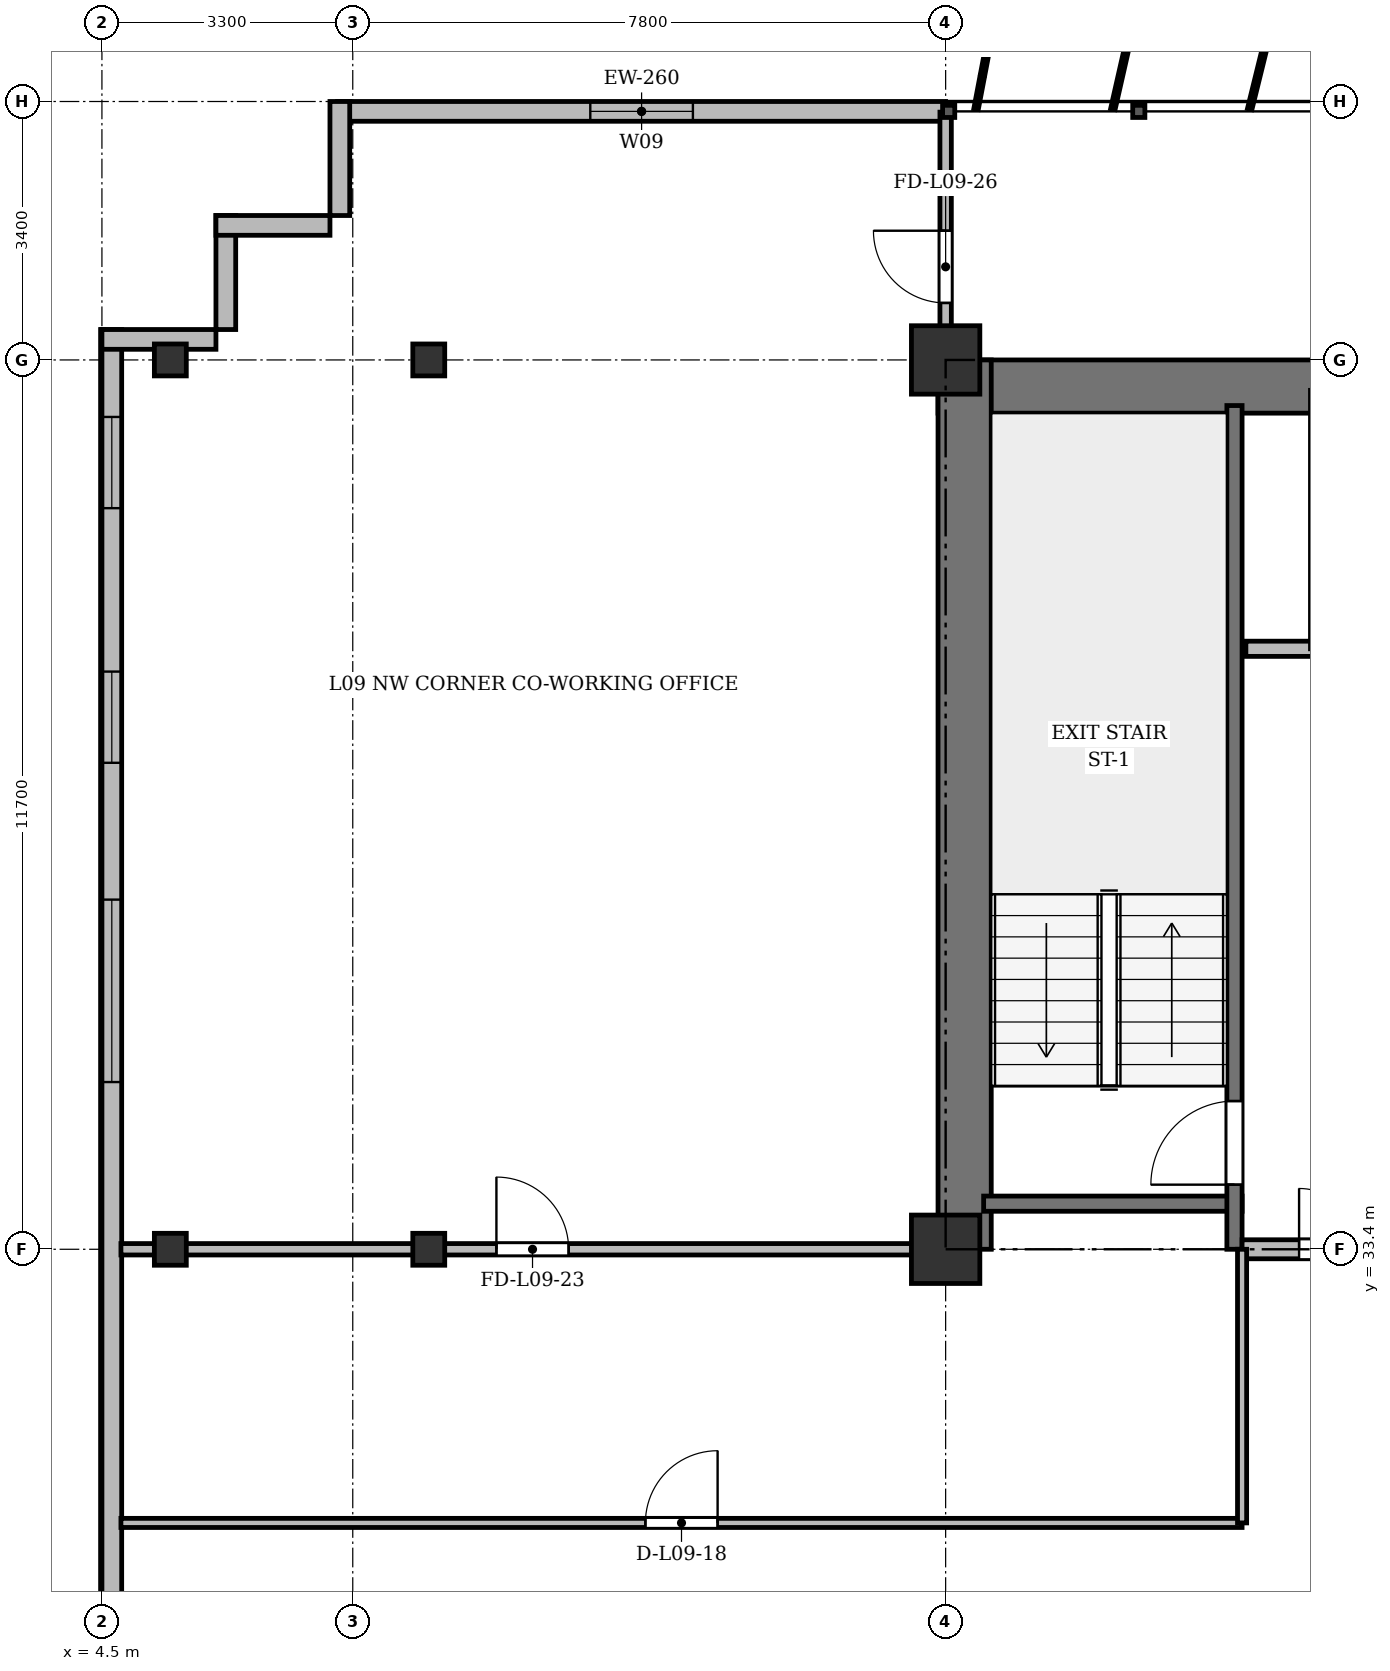
"""IFC4 building model, lengths in metres.
Left out: names, types, materials, properties, quantities, classifications, styles, units other than length and angle.
Written with IfcOpenShell. Run it as: python <this file> out.ifc"""

import sys

from ifc_helpers import new_model, si_unit, direction, frame, frame_2d, origin, origin_2d, place, context, subcontext, project, spatial, rectangle, i_section, extrude, source, transform, mapped, element, fill, save


model = new_model("IFC4")
c1 = context("Model", 3, precision=1e-05, world=origin(), true_north=direction((0.0, 1.0)))
c2 = subcontext(c1, "Body", "Model", "MODEL_VIEW")
j1 = project(units=[si_unit("LENGTHUNIT", "METRE"), si_unit("PLANEANGLEUNIT", "RADIAN")], contexts=[c1])
p1 = place(None, origin())
s1 = spatial("IfcSite", under=j1, at=p1, CompositionType="ELEMENT")
p2 = place(p1, origin())
s2 = spatial("IfcBuilding", under=s1, at=p2, CompositionType="ELEMENT")
p3 = place(p2, frame((0.0, 0.0, 37.9)))
s3 = spatial("IfcBuildingStorey", under=s2, at=p3, CompositionType="ELEMENT", Elevation=37.9)
m1 = source(origin(), c2, "Body", "SweptSolid", [
    extrude(i_section(OverallWidth=0.42, OverallDepth=0.42, WebThickness=0.026, FlangeThickness=0.04, at=origin_2d()), origin(), (0.0, 0.0, 1.0), 3.6),
])
for number, where, z_axis, x_axis in (
    (1, (5.4, 33.4, 0.0), (0.0, 0.0, 1.0), (1.0, 0.0, 0.0)),
    (2, (5.4, 45.1, 0.0), (0.0, 0.0, 1.0), (1.0, 0.0, 0.0)),
    (3, (8.8, 33.4, 0.0), (0.0, 0.0, 1.0), (1.0, 0.0, 0.0)),
    (4, (8.8, 45.1, 0.0), (0.0, 0.0, 1.0), (1.0, 0.0, 0.0)),
):
    element("IfcColumn", number, at=place(p3, frame(where, z_axis=z_axis, x_axis=x_axis)), inside=s3, PredefinedType="COLUMN", context=c2, shape_type="MappedRepresentation", body=[
        mapped(m1, transform((0.0, 0.0, 0.0), x_axis=(1.0, 0.0, 0.0), y_axis=(0.0, 1.0, 0.0), z_axis=(0.0, 0.0, 1.0), scale=1.0)),
    ])
m2 = source(origin(), c2, "Body", "SweptSolid", [
    extrude(rectangle(XDim=0.9, YDim=0.9, at=origin_2d()), origin(), (0.0, 0.0, 1.0), 3.6),
])
for number, where, z_axis, x_axis in (
    (5, (15.6, 33.4, 0.0), (0.0, 0.0, 1.0), (1.0, 0.0, 0.0)),
    (6, (15.6, 45.1, 0.0), (0.0, 0.0, 1.0), (1.0, 0.0, 0.0)),
):
    element("IfcColumn", number, at=place(p3, frame(where, z_axis=z_axis, x_axis=x_axis)), inside=s3, PredefinedType="COLUMN", context=c2, shape_type="MappedRepresentation", body=[
        mapped(m2, transform((0.0, 0.0, 0.0), x_axis=(1.0, 0.0, 0.0), y_axis=(0.0, 1.0, 0.0), z_axis=(0.0, 0.0, 1.0), scale=1.0)),
    ])
p4 = place(p3, frame((7.6, 48.37, 0.0), z_axis=(0.0, 0.0, 1.0), x_axis=(1.0, 0.0, 0.0)))
e7 = element("IfcWall", 7, at=p4, inside=s3, PredefinedType="SOLIDWALL", context=c2, shape_type="SweptSolid", body=[
    extrude(rectangle(XDim=8.0, YDim=0.26, at=frame_2d((4.0, 0.0))), origin(), (0.0, 0.0, 1.0), 3.34),
])
p5 = place(p4, frame((3.325, 0.0, 0.9)))
e8 = element("IfcOpeningElement", 8, at=p5, cuts=e7, PredefinedType="OPENING", context=c2, shape_type="SweptSolid", body=[
    extrude(rectangle(XDim=1.35, YDim=1.5, at=frame_2d((0.675, 0.75))), frame((0.0, 0.14, 0.0), z_axis=(0.0, -1.0, 0.0), x_axis=(1.0, 0.0, 0.0)), (0.0, 0.0, 1.0), 0.28),
])
p6 = place(p3, frame((4.63, 5.9, 0.0), z_axis=(0.0, 0.0, 1.0), x_axis=(0.0, 1.0, 0.0)))
e9 = element("IfcWall", 9, at=p6, inside=s3, PredefinedType="SOLIDWALL", context=c2, shape_type="SweptSolid", body=[
    extrude(rectangle(XDim=39.6, YDim=0.26, at=frame_2d((19.8, 0.0))), origin(), (0.0, 0.0, 1.0), 3.34),
])
p7 = place(p6, frame((1.45, 0.0, 0.92)))
e10 = element("IfcOpeningElement", 10, at=p7, cuts=e9, PredefinedType="OPENING", context=c2, shape_type="SweptSolid", body=[
    extrude(rectangle(XDim=1.2, YDim=1.65, at=frame_2d((0.6, 0.825))), frame((0.0, 0.14, 0.0), z_axis=(0.0, -1.0, 0.0), x_axis=(1.0, 0.0, 0.0)), (0.0, 0.0, 1.0), 0.28),
])
p8 = place(p6, frame((4.3, 0.0, 0.92)))
e11 = element("IfcOpeningElement", 11, at=p8, cuts=e9, PredefinedType="OPENING", context=c2, shape_type="SweptSolid", body=[
    extrude(rectangle(XDim=2.4, YDim=2.1, at=frame_2d((1.2, 1.05))), frame((0.0, 0.14, 0.0), z_axis=(0.0, -1.0, 0.0), x_axis=(1.0, 0.0, 0.0)), (0.0, 0.0, 1.0), 0.28),
])
p9 = place(p6, frame((15.7, 0.0, 0.92)))
e12 = element("IfcOpeningElement", 12, at=p9, cuts=e9, PredefinedType="OPENING", context=c2, shape_type="SweptSolid", body=[
    extrude(rectangle(XDim=2.4, YDim=2.1, at=frame_2d((1.2, 1.05))), frame((0.0, 0.14, 0.0), z_axis=(0.0, -1.0, 0.0), x_axis=(1.0, 0.0, 0.0)), (0.0, 0.0, 1.0), 0.28),
])
p10 = place(p6, frame((29.7, 0.0, 0.92)))
e13 = element("IfcOpeningElement", 13, at=p10, cuts=e9, PredefinedType="OPENING", context=c2, shape_type="SweptSolid", body=[
    extrude(rectangle(XDim=2.4, YDim=2.1, at=frame_2d((1.2, 1.05))), frame((0.0, 0.14, 0.0), z_axis=(0.0, -1.0, 0.0), x_axis=(1.0, 0.0, 0.0)), (0.0, 0.0, 1.0), 0.28),
])
p11 = place(p6, frame((33.9, 0.0, 0.92)))
e14 = element("IfcOpeningElement", 14, at=p11, cuts=e9, PredefinedType="OPENING", context=c2, shape_type="SweptSolid", body=[
    extrude(rectangle(XDim=1.2, YDim=1.65, at=frame_2d((0.6, 0.825))), frame((0.0, 0.14, 0.0), z_axis=(0.0, -1.0, 0.0), x_axis=(1.0, 0.0, 0.0)), (0.0, 0.0, 1.0), 0.28),
])
p12 = place(p6, frame((37.25, 0.0, 0.92)))
e15 = element("IfcOpeningElement", 15, at=p12, cuts=e9, PredefinedType="OPENING", context=c2, shape_type="SweptSolid", body=[
    extrude(rectangle(XDim=1.2, YDim=1.65, at=frame_2d((0.6, 0.825))), frame((0.0, 0.14, 0.0), z_axis=(0.0, -1.0, 0.0), x_axis=(1.0, 0.0, 0.0)), (0.0, 0.0, 1.0), 0.28),
])
p13 = place(p3, frame((4.5, 45.37, 0.0), z_axis=(0.0, 0.0, 1.0), x_axis=(1.0, 0.0, 0.0)))
e16 = element("IfcWall", 16, at=p13, inside=s3, PredefinedType="SOLIDWALL", context=c2, shape_type="SweptSolid", body=[
    extrude(rectangle(XDim=1.5, YDim=0.26, at=frame_2d((0.75, 0.0))), origin(), (0.0, 0.0, 1.0), 2.69),
])
for number, where, z_axis, x_axis in (
    (17, (6.13, 45.5, 0.0), (0.0, 0.0, 1.0), (0.0, 1.0, 0.0)),
    (18, (6.0, 46.87, 0.0), (0.0, 0.0, 1.0), (1.0, 0.0, 0.0)),
    (19, (7.63, 47.0, 0.0), (0.0, 0.0, 1.0), (0.0, 1.0, 0.0)),
):
    element("IfcWall", number, at=place(p3, frame(where, z_axis=z_axis, x_axis=x_axis)), inside=s3, PredefinedType="SOLIDWALL", context=c2, shape_type="SweptSolid", body=[
        extrude(rectangle(XDim=1.5, YDim=0.26, at=frame_2d((0.75, 0.0))), origin(), (0.0, 0.0, 1.0), 3.34),
    ])
p14 = place(p3, frame((15.5, 44.75, 0.0), z_axis=(0.0, 0.0, 1.0), x_axis=(1.0, 0.0, 0.0)))
e20 = element("IfcWall", 20, at=p14, inside=s3, PredefinedType="SHEAR", context=c2, shape_type="SweptSolid", body=[
    extrude(rectangle(XDim=43.4, YDim=0.7, at=frame_2d((21.7, 0.0))), origin(), (0.0, 0.0, 1.0), 3.34),
])
p15 = place(p3, frame((15.85, 33.4, 0.0), z_axis=(0.0, 0.0, 1.0), x_axis=(0.0, 1.0, 0.0)))
e21 = element("IfcWall", 21, at=p15, inside=s3, PredefinedType="SHEAR", context=c2, shape_type="SweptSolid", body=[
    extrude(rectangle(XDim=11.7, YDim=0.7, at=frame_2d((5.85, 0.0))), origin(), (0.0, 0.0, 1.0), 3.34),
])
p16 = place(p3, frame((16.1, 34.0, 0.0), z_axis=(0.0, 0.0, 1.0), x_axis=(1.0, 0.0, 0.0)))
e22 = element("IfcWall", 22, at=p16, inside=s3, PredefinedType="SHEAR", context=c2, shape_type="SweptSolid", body=[
    extrude(rectangle(XDim=3.4, YDim=0.2, at=frame_2d((1.7, 0.0))), origin(), (0.0, 0.0, 1.0), 3.34),
])
p17 = place(p3, frame((19.4, 33.4, 0.0), z_axis=(0.0, 0.0, 1.0), x_axis=(0.0, 1.0, 0.0)))
e23 = element("IfcWall", 23, at=p17, inside=s3, PredefinedType="SHEAR", context=c2, shape_type="SweptSolid", body=[
    extrude(rectangle(XDim=11.1, YDim=0.2, at=frame_2d((5.55, 0.0))), origin(), (0.0, 0.0, 1.0), 3.34),
])
p18 = place(p17, frame((0.85, 0.0, 0.0)))
e24 = element("IfcOpeningElement", 24, at=p18, cuts=e23, PredefinedType="OPENING", context=c2, shape_type="SweptSolid", body=[
    extrude(rectangle(XDim=1.1, YDim=2.15, at=frame_2d((0.55, 1.075))), frame((0.0, 0.11, 0.0), z_axis=(0.0, -1.0, 0.0), x_axis=(1.0, 0.0, 0.0)), (0.0, 0.0, 1.0), 0.22),
])
p19 = place(p3, frame((19.55, 41.3, 0.0), z_axis=(0.0, 0.0, 1.0), x_axis=(1.0, 0.0, 0.0)))
e25 = element("IfcWall", 25, at=p19, inside=s3, PredefinedType="SOLIDWALL", context=c2, shape_type="SweptSolid", body=[
    extrude(rectangle(XDim=6.75, YDim=0.2, at=frame_2d((3.375, 0.0))), origin(), (0.0, 0.0, 1.0), 3.34),
])
p20 = place(p19, frame((1.7, 0.0, 0.0)))
e26 = element("IfcOpeningElement", 26, at=p20, cuts=e25, PredefinedType="OPENING", context=c2, shape_type="SweptSolid", body=[
    extrude(rectangle(XDim=1.1, YDim=2.15, at=frame_2d((0.55, 1.075))), frame((0.0, 0.11, 0.0), z_axis=(0.0, -1.0, 0.0), x_axis=(1.0, 0.0, 0.0)), (0.0, 0.0, 1.0), 0.22),
])
p21 = place(p19, frame((4.4, 0.0, 0.0)))
e27 = element("IfcOpeningElement", 27, at=p21, cuts=e25, PredefinedType="OPENING", context=c2, shape_type="SweptSolid", body=[
    extrude(rectangle(XDim=1.1, YDim=2.15, at=frame_2d((0.55, 1.075))), frame((0.0, 0.11, 0.0), z_axis=(0.0, -1.0, 0.0), x_axis=(1.0, 0.0, 0.0)), (0.0, 0.0, 1.0), 0.22),
])
p22 = place(p3, frame((19.5, 33.4, 0.0), z_axis=(0.0, 0.0, 1.0), x_axis=(1.0, 0.0, 0.0)))
e28 = element("IfcWall", 28, at=p22, inside=s3, PredefinedType="PARTITIONING", context=c2, shape_type="SweptSolid", body=[
    extrude(rectangle(XDim=6.8, YDim=0.25, at=frame_2d((3.4, 0.0))), origin(), (0.0, 0.0, 1.0), 2.69),
])
p23 = place(p22, frame((0.75, 0.0, 0.0)))
e29 = element("IfcOpeningElement", 29, at=p23, cuts=e28, PredefinedType="OPENING", context=c2, shape_type="SweptSolid", body=[
    extrude(rectangle(XDim=1.6, YDim=2.2, at=frame_2d((0.8, 1.1))), frame((0.0, 0.135, 0.0), z_axis=(0.0, -1.0, 0.0), x_axis=(1.0, 0.0, 0.0)), (0.0, 0.0, 1.0), 0.27),
])
p24 = place(p3, frame((4.75, 29.8, 0.0), z_axis=(0.0, 0.0, 1.0), x_axis=(1.0, 0.0, 0.0)))
e30 = element("IfcWall", 30, at=p24, inside=s3, PredefinedType="PARTITIONING", context=c2, shape_type="SweptSolid", body=[
    extrude(rectangle(XDim=14.75, YDim=0.12, at=frame_2d((7.375, 0.0))), origin(), (0.0, 0.0, 1.0), 2.752),
])
p25 = place(p24, frame((6.9, 0.0, 0.0)))
e31 = element("IfcOpeningElement", 31, at=p25, cuts=e30, PredefinedType="OPENING", context=c2, shape_type="SweptSolid", body=[
    extrude(rectangle(XDim=0.95, YDim=2.15, at=frame_2d((0.475, 1.075))), frame((0.0, 0.07, 0.0), z_axis=(0.0, -1.0, 0.0), x_axis=(1.0, 0.0, 0.0)), (0.0, 0.0, 1.0), 0.14),
])
p26 = place(p3, frame((19.5, 29.8, 0.0), z_axis=(0.0, 0.0, 1.0), x_axis=(0.0, 1.0, 0.0)))
e32 = element("IfcWall", 32, at=p26, inside=s3, PredefinedType="PARTITIONING", context=c2, shape_type="SweptSolid", body=[
    extrude(rectangle(XDim=3.6, YDim=0.12, at=frame_2d((1.8, 0.0))), origin(), (0.0, 0.0, 1.0), 2.69),
])
p27 = place(p3, frame((4.75, 33.4, 0.0), z_axis=(0.0, 0.0, 1.0), x_axis=(1.0, 0.0, 0.0)))
e33 = element("IfcWall", 33, at=p27, inside=s3, PredefinedType="PARTITIONING", context=c2, shape_type="SweptSolid", body=[
    extrude(rectangle(XDim=10.85, YDim=0.15, at=frame_2d((5.425, 0.0))), origin(), (0.0, 0.0, 1.0), 2.69),
])
p28 = place(p27, frame((4.94, 0.0, 0.0)))
e34 = element("IfcOpeningElement", 34, at=p28, cuts=e33, PredefinedType="OPENING", context=c2, shape_type="SweptSolid", body=[
    extrude(rectangle(XDim=0.95, YDim=2.15, at=frame_2d((0.475, 1.075))), frame((0.0, 0.085, 0.0), z_axis=(0.0, -1.0, 0.0), x_axis=(1.0, 0.0, 0.0)), (0.0, 0.0, 1.0), 0.17),
])
p29 = place(p3, frame((15.6, 44.75, 0.0), z_axis=(0.0, 0.0, 1.0), x_axis=(0.0, 1.0, 0.0)))
e35 = element("IfcWall", 35, at=p29, inside=s3, PredefinedType="PARTITIONING", context=c2, shape_type="SweptSolid", body=[
    extrude(rectangle(XDim=3.61, YDim=0.15, at=frame_2d((1.805, 0.0))), origin(), (0.0, 0.0, 1.0), 2.752),
])
p30 = place(p29, frame((1.1, 0.0, 0.0)))
e36 = element("IfcOpeningElement", 36, at=p30, cuts=e35, PredefinedType="OPENING", context=c2, shape_type="SweptSolid", body=[
    extrude(rectangle(XDim=0.95, YDim=2.15, at=frame_2d((0.475, 1.075))), frame((0.0, 0.085, 0.0), z_axis=(0.0, -1.0, 0.0), x_axis=(1.0, 0.0, 0.0)), (0.0, 0.0, 1.0), 0.17),
])
m3 = source(origin(), c2, "Body", "SweptSolid", [
    extrude(rectangle(XDim=1.35, YDim=1.5, at=frame_2d((0.675, 0.75))), frame((0.0, 0.03, 0.0), z_axis=(0.0, -1.0, 0.0), x_axis=(1.0, 0.0, 0.0)), (0.0, 0.0, 1.0), 0.06),
])
p31 = place(p5, origin())
e37 = element("IfcWindow", 37, at=p31, inside=s3, PartitioningType="SINGLE_PANEL", PredefinedType="WINDOW", context=c2, shape_type="MappedRepresentation", body=[
    mapped(m3, transform((0.0, 0.0, 0.0), x_axis=(1.0, 0.0, 0.0), y_axis=(0.0, 1.0, 0.0), z_axis=(0.0, 0.0, 1.0), scale=1.0)),
])
fill(e8, e37)
m4 = source(origin(), c2, "Body", "SweptSolid", [
    extrude(rectangle(XDim=2.4, YDim=2.1, at=frame_2d((1.2, 1.05))), frame((0.0, 0.03, 0.0), z_axis=(0.0, -1.0, 0.0), x_axis=(1.0, 0.0, 0.0)), (0.0, 0.0, 1.0), 0.06),
])
p32 = place(p10, origin())
e38 = element("IfcWindow", 38, at=p32, inside=s3, PartitioningType="SINGLE_PANEL", PredefinedType="WINDOW", context=c2, shape_type="MappedRepresentation", body=[
    mapped(m4, transform((0.0, 0.0, 0.0), x_axis=(1.0, 0.0, 0.0), y_axis=(0.0, 1.0, 0.0), z_axis=(0.0, 0.0, 1.0), scale=1.0)),
])
fill(e13, e38)
m5 = source(origin(), c2, "Body", "SweptSolid", [
    extrude(rectangle(XDim=1.2, YDim=1.65, at=frame_2d((0.6, 0.825))), frame((0.0, 0.03, 0.0), z_axis=(0.0, -1.0, 0.0), x_axis=(1.0, 0.0, 0.0)), (0.0, 0.0, 1.0), 0.06),
])
p33 = place(p11, origin())
e39 = element("IfcWindow", 39, at=p33, inside=s3, PartitioningType="SINGLE_PANEL", PredefinedType="WINDOW", context=c2, shape_type="MappedRepresentation", body=[
    mapped(m5, transform((0.0, 0.0, 0.0), x_axis=(1.0, 0.0, 0.0), y_axis=(0.0, 1.0, 0.0), z_axis=(0.0, 0.0, 1.0), scale=1.0)),
])
fill(e14, e39)
p34 = place(p12, origin())
e40 = element("IfcWindow", 40, at=p34, inside=s3, PartitioningType="SINGLE_PANEL", PredefinedType="WINDOW", context=c2, shape_type="MappedRepresentation", body=[
    mapped(m5, transform((0.0, 0.0, 0.0), x_axis=(1.0, 0.0, 0.0), y_axis=(0.0, 1.0, 0.0), z_axis=(0.0, 0.0, 1.0), scale=1.0)),
])
fill(e15, e40)
m6 = source(origin(), c2, "Body", "SweptSolid", [
    extrude(rectangle(XDim=1.1, YDim=2.15, at=frame_2d((0.55, 1.075))), frame((0.0, 0.025, 0.0), z_axis=(0.0, -1.0, 0.0), x_axis=(1.0, 0.0, 0.0)), (0.0, 0.0, 1.0), 0.05),
])
p35 = place(p18, origin())
e41 = element("IfcDoor", 41, at=p35, inside=s3, OperationType="SINGLE_SWING_LEFT", PredefinedType="DOOR", context=c2, shape_type="MappedRepresentation", body=[
    mapped(m6, transform((0.0, 0.0, 0.0), x_axis=(1.0, 0.0, 0.0), y_axis=(0.0, 1.0, 0.0), z_axis=(0.0, 0.0, 1.0), scale=1.0)),
])
fill(e24, e41)
m7 = source(origin(), c2, "Body", "SweptSolid", [
    extrude(rectangle(XDim=1.6, YDim=2.2, at=frame_2d((0.8, 1.1))), frame((0.0, 0.025, 0.0), z_axis=(0.0, -1.0, 0.0), x_axis=(1.0, 0.0, 0.0)), (0.0, 0.0, 1.0), 0.05),
])
p36 = place(p23, origin())
e42 = element("IfcDoor", 42, at=p36, inside=s3, OperationType="DOUBLE_DOOR_SINGLE_SWING", PredefinedType="DOOR", context=c2, shape_type="MappedRepresentation", body=[
    mapped(m7, transform((0.0, 0.0, 0.0), x_axis=(1.0, 0.0, 0.0), y_axis=(0.0, 1.0, 0.0), z_axis=(0.0, 0.0, 1.0), scale=1.0)),
])
fill(e29, e42)
m8 = source(origin(), c2, "Body", "SweptSolid", [
    extrude(rectangle(XDim=0.95, YDim=2.15, at=frame_2d((0.475, 1.075))), frame((0.0, 0.025, 0.0), z_axis=(0.0, -1.0, 0.0), x_axis=(1.0, 0.0, 0.0)), (0.0, 0.0, 1.0), 0.05),
])
p37 = place(p25, origin())
e43 = element("IfcDoor", 43, at=p37, inside=s3, OperationType="SINGLE_SWING_RIGHT", PredefinedType="DOOR", context=c2, shape_type="MappedRepresentation", body=[
    mapped(m8, transform((0.0, 0.0, 0.0), x_axis=(1.0, 0.0, 0.0), y_axis=(0.0, 1.0, 0.0), z_axis=(0.0, 0.0, 1.0), scale=1.0)),
])
fill(e31, e43)
p38 = place(p28, origin())
e44 = element("IfcDoor", 44, at=p38, inside=s3, OperationType="SINGLE_SWING_LEFT", PredefinedType="DOOR", context=c2, shape_type="MappedRepresentation", body=[
    mapped(m8, transform((0.0, 0.0, 0.0), x_axis=(1.0, 0.0, 0.0), y_axis=(0.0, 1.0, 0.0), z_axis=(0.0, 0.0, 1.0), scale=1.0)),
])
fill(e34, e44)
p39 = place(p30, origin())
e45 = element("IfcDoor", 45, at=p39, inside=s3, OperationType="SINGLE_SWING_RIGHT", PredefinedType="DOOR", context=c2, shape_type="MappedRepresentation", body=[
    mapped(m8, transform((0.0, 0.0, 0.0), x_axis=(1.0, 0.0, 0.0), y_axis=(0.0, 1.0, 0.0), z_axis=(0.0, 0.0, 1.0), scale=1.0)),
])
fill(e36, e45)
save(model, sys.argv[1])
